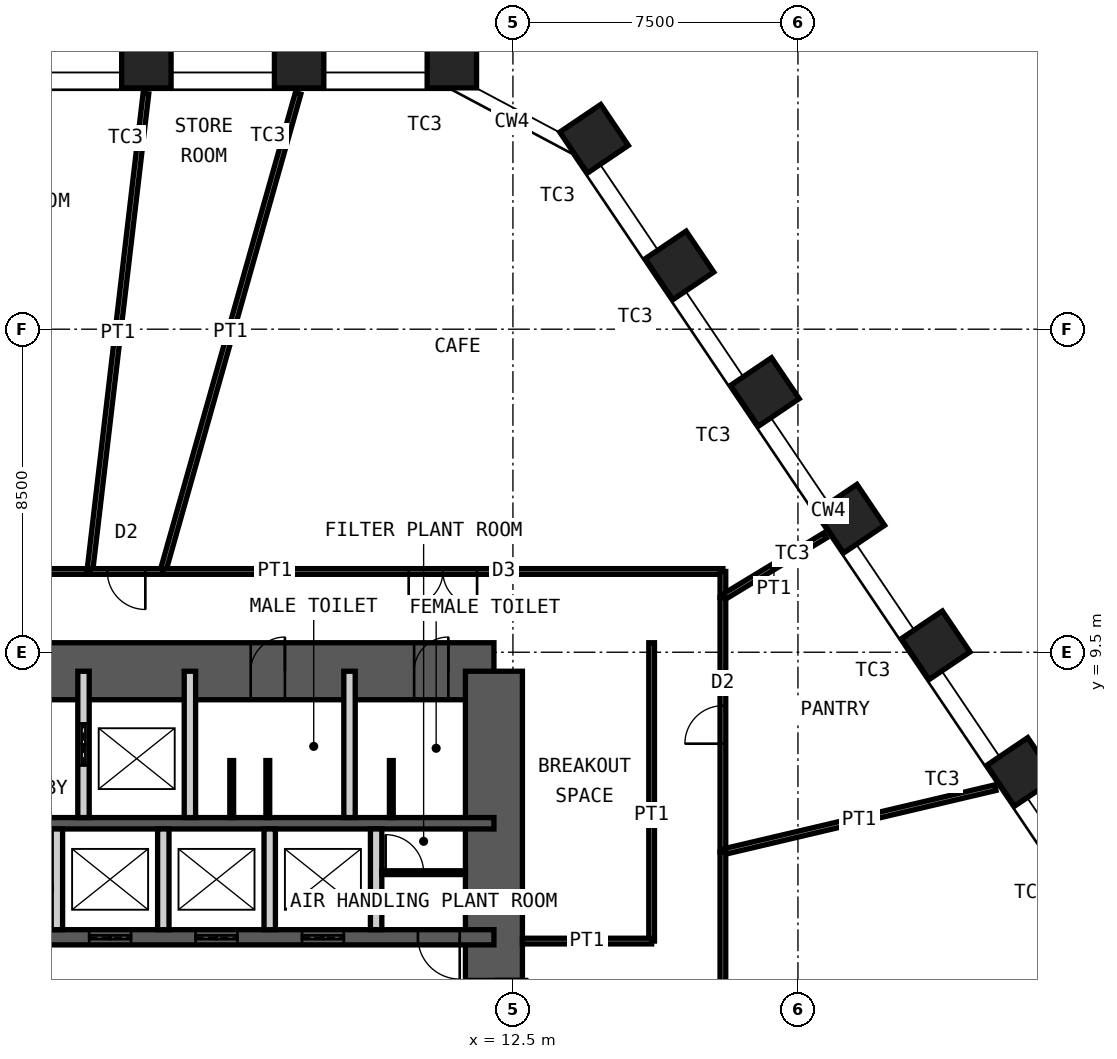
"""IFC4 building model, lengths in metres.
Left out: names, types, materials, properties, quantities, classifications, styles, units other than length and angle.
Written with IfcOpenShell. Run it as: python <this file> out.ifc"""

import sys

from ifc_helpers import new_model, si_unit, direction, frame, frame_2d, origin, origin_2d, place, context, subcontext, project, spatial, rectangle, hollow_rectangle, extrude, element, fill, save


model = new_model("IFC4")
c1 = context("Model", 3, precision=1e-05, world=origin(), true_north=direction((0.0, 1.0)))
c2 = subcontext(c1, "Body", "Model", "MODEL_VIEW")
j1 = project(units=[si_unit("LENGTHUNIT", "METRE"), si_unit("PLANEANGLEUNIT", "RADIAN")], contexts=[c1])
p1 = place(None, origin())
s1 = spatial("IfcSite", under=j1, at=p1, CompositionType="ELEMENT")
p2 = place(p1, origin())
s2 = spatial("IfcBuilding", under=s1, at=p2, CompositionType="ELEMENT")
p3 = place(p2, frame((0.0, 0.0, 132.4)))
s3 = spatial("IfcBuildingStorey", under=s2, at=p3, CompositionType="ELEMENT", Elevation=132.4)
for number, where, z_axis, x_axis in (
    (1, (2.854, 25.0, 0.0), (0.0, 0.0, 1.0), (-1.0, 0.0, 0.0)),
    (2, (6.874, 25.0, 0.0), (0.0, 0.0, 1.0), (-1.0, 0.0, 0.0)),
    (3, (10.893, 25.0, 0.0), (0.0, 0.0, 1.0), (-1.0, 0.0, 0.0)),
    (4, (14.635, 23.01, 0.0), (0.0, 0.0, 1.0), (-0.559, 0.829, 0.0)),
    (5, (16.882, 19.678, 0.0), (0.0, 0.0, 1.0), (-0.559, 0.829, 0.0)),
    (6, (19.13, 16.346, 0.0), (0.0, 0.0, 1.0), (-0.559, 0.829, 0.0)),
    (7, (21.377, 13.014, 0.0), (0.0, 0.0, 1.0), (-0.559, 0.829, 0.0)),
    (8, (23.625, 9.682, 0.0), (0.0, 0.0, 1.0), (-0.559, 0.829, 0.0)),
    (9, (25.872, 6.351, 0.0), (0.0, 0.0, 1.0), (-0.559, 0.829, 0.0)),
):
    element("IfcColumn", number, at=place(p3, frame(where, z_axis=z_axis, x_axis=x_axis)), inside=s3, PredefinedType="COLUMN", context=c2, shape_type="SweptSolid", body=[
        extrude(hollow_rectangle(XDim=1.3, YDim=1.3, WallThickness=0.1, at=origin_2d()), origin(), (0.0, 0.0, 1.0), 4.2),
    ])
p4 = place(p3, frame((-12.0, 9.0, 0.0), z_axis=(0.0, 0.0, 1.0), x_axis=(1.0, 0.0, 0.0)))
e10 = element("IfcWall", 10, at=p4, inside=s3, PredefinedType="SHEAR", context=c2, shape_type="SweptSolid", body=[
    extrude(rectangle(XDim=24.0, YDim=1.5, at=frame_2d((12.0, 0.0))), origin(), (0.0, 0.0, 1.0), 4.2),
])
p5 = place(p4, frame((10.4, 0.0, 0.0)))
e11 = element("IfcOpeningElement", 11, at=p5, cuts=e10, PredefinedType="OPENING", context=c2, shape_type="SweptSolid", body=[
    extrude(rectangle(XDim=1.0, YDim=2.1, at=frame_2d((0.5, 1.05))), frame((0.0, 0.76, 0.0), z_axis=(0.0, -1.0, 0.0), x_axis=(1.0, 0.0, 0.0)), (0.0, 0.0, 1.0), 1.52),
])
p6 = place(p4, frame((17.6, 0.0, 0.0)))
e12 = element("IfcOpeningElement", 12, at=p6, cuts=e10, PredefinedType="OPENING", context=c2, shape_type="SweptSolid", body=[
    extrude(rectangle(XDim=0.9, YDim=2.1, at=frame_2d((0.45, 1.05))), frame((0.0, 0.76, 0.0), z_axis=(0.0, -1.0, 0.0), x_axis=(1.0, 0.0, 0.0)), (0.0, 0.0, 1.0), 1.52),
])
p7 = place(p4, frame((21.9, 0.0, 0.0)))
e13 = element("IfcOpeningElement", 13, at=p7, cuts=e10, PredefinedType="OPENING", context=c2, shape_type="SweptSolid", body=[
    extrude(rectangle(XDim=0.9, YDim=2.1, at=frame_2d((0.45, 1.05))), frame((0.0, 0.76, 0.0), z_axis=(0.0, -1.0, 0.0), x_axis=(1.0, 0.0, 0.0)), (0.0, 0.0, 1.0), 1.52),
])
p8 = place(p3, frame((12.0, -9.0, 0.0), z_axis=(0.0, 0.0, 1.0), x_axis=(0.0, 1.0, 0.0)))
e14 = element("IfcWall", 14, at=p8, inside=s3, PredefinedType="SHEAR", context=c2, shape_type="SweptSolid", body=[
    extrude(rectangle(XDim=18.0, YDim=1.5, at=frame_2d((9.0, 0.0))), origin(), (0.0, 0.0, 1.0), 4.2),
])
p9 = place(p8, frame((8.1, 0.0, 0.0)))
e15 = element("IfcOpeningElement", 15, at=p9, cuts=e14, PredefinedType="OPENING", context=c2, shape_type="SweptSolid", body=[
    extrude(rectangle(XDim=1.8, YDim=2.1, at=frame_2d((0.9, 1.05))), frame((0.0, 0.76, 0.0), z_axis=(0.0, -1.0, 0.0), x_axis=(1.0, 0.0, 0.0)), (0.0, 0.0, 1.0), 1.52),
])
p10 = place(p3, frame((-12.0, 5.0, 0.0), z_axis=(0.0, 0.0, 1.0), x_axis=(1.0, 0.0, 0.0)))
e16 = element("IfcWall", 16, at=p10, inside=s3, PredefinedType="SHEAR", context=c2, shape_type="SweptSolid", body=[
    extrude(rectangle(XDim=24.0, YDim=0.3, at=frame_2d((12.0, 0.0))), origin(), (0.0, 0.0, 1.0), 4.2),
])
p11 = place(p3, frame((-12.0, 2.0, 0.0), z_axis=(0.0, 0.0, 1.0), x_axis=(1.0, 0.0, 0.0)))
e17 = element("IfcWall", 17, at=p11, inside=s3, PredefinedType="SHEAR", context=c2, shape_type="SweptSolid", body=[
    extrude(rectangle(XDim=24.0, YDim=0.4, at=frame_2d((12.0, 0.0))), origin(), (0.0, 0.0, 1.0), 4.2),
])
p12 = place(p11, frame((2.4, 0.0, 0.0)))
e18 = element("IfcOpeningElement", 18, at=p12, cuts=e17, PredefinedType="OPENING", context=c2, shape_type="SweptSolid", body=[
    extrude(rectangle(XDim=1.1, YDim=2.1, at=frame_2d((0.55, 1.05))), frame((0.0, 0.21, 0.0), z_axis=(0.0, -1.0, 0.0), x_axis=(1.0, 0.0, 0.0)), (0.0, 0.0, 1.0), 0.42),
])
p13 = place(p11, frame((22.0, 0.0, 0.0)))
e19 = element("IfcOpeningElement", 19, at=p13, cuts=e17, PredefinedType="OPENING", context=c2, shape_type="SweptSolid", body=[
    extrude(rectangle(XDim=1.1, YDim=2.1, at=frame_2d((0.55, 1.05))), frame((0.0, 0.21, 0.0), z_axis=(0.0, -1.0, 0.0), x_axis=(1.0, 0.0, 0.0)), (0.0, 0.0, 1.0), 0.42),
])
p14 = place(p11, frame((10.15, 0.0, 0.0)))
e20 = element("IfcOpeningElement", 20, at=p14, cuts=e17, PredefinedType="OPENING", context=c2, shape_type="SweptSolid", body=[
    extrude(rectangle(XDim=1.0, YDim=2.1, at=frame_2d((0.5, 1.05))), frame((0.0, 0.21, 0.0), z_axis=(0.0, -1.0, 0.0), x_axis=(1.0, 0.0, 0.0)), (0.0, 0.0, 1.0), 0.42),
])
p15 = place(p11, frame((6.9, 0.0, 0.0)))
e21 = element("IfcOpeningElement", 21, at=p15, cuts=e17, PredefinedType="OPENING", context=c2, shape_type="SweptSolid", body=[
    extrude(rectangle(XDim=1.0, YDim=2.1, at=frame_2d((0.5, 1.05))), frame((0.0, 0.21, 0.0), z_axis=(0.0, -1.0, 0.0), x_axis=(1.0, 0.0, 0.0)), (0.0, 0.0, 1.0), 0.42),
])
p16 = place(p11, frame((13.35, 0.0, 0.0)))
e22 = element("IfcOpeningElement", 22, at=p16, cuts=e17, PredefinedType="OPENING", context=c2, shape_type="SweptSolid", body=[
    extrude(rectangle(XDim=1.1, YDim=2.4, at=frame_2d((0.55, 1.2))), frame((0.0, 0.21, 0.0), z_axis=(0.0, -1.0, 0.0), x_axis=(1.0, 0.0, 0.0)), (0.0, 0.0, 1.0), 0.42),
])
p17 = place(p11, frame((16.15, 0.0, 0.0)))
e23 = element("IfcOpeningElement", 23, at=p17, cuts=e17, PredefinedType="OPENING", context=c2, shape_type="SweptSolid", body=[
    extrude(rectangle(XDim=1.1, YDim=2.4, at=frame_2d((0.55, 1.2))), frame((0.0, 0.21, 0.0), z_axis=(0.0, -1.0, 0.0), x_axis=(1.0, 0.0, 0.0)), (0.0, 0.0, 1.0), 0.42),
])
p18 = place(p11, frame((18.95, 0.0, 0.0)))
e24 = element("IfcOpeningElement", 24, at=p18, cuts=e17, PredefinedType="OPENING", context=c2, shape_type="SweptSolid", body=[
    extrude(rectangle(XDim=1.1, YDim=2.4, at=frame_2d((0.55, 1.2))), frame((0.0, 0.21, 0.0), z_axis=(0.0, -1.0, 0.0), x_axis=(1.0, 0.0, 0.0)), (0.0, 0.0, 1.0), 0.42),
])
p19 = place(p3, frame((1.2, 5.15, 0.0), z_axis=(0.0, 0.0, 1.0), x_axis=(0.0, 1.0, 0.0)))
e25 = element("IfcWall", 25, at=p19, inside=s3, PredefinedType="PARTITIONING", context=c2, shape_type="SweptSolid", body=[
    extrude(rectangle(XDim=3.85, YDim=0.3, at=frame_2d((1.925, 0.0))), origin(), (0.0, 0.0, 1.0), 3.98),
])
p20 = place(p19, frame((1.375, 0.0, 0.0)))
e26 = element("IfcOpeningElement", 26, at=p20, cuts=e25, PredefinedType="OPENING", context=c2, shape_type="SweptSolid", body=[
    extrude(rectangle(XDim=1.1, YDim=2.4, at=frame_2d((0.55, 1.2))), frame((0.0, 0.16, 0.0), z_axis=(0.0, -1.0, 0.0), x_axis=(1.0, 0.0, 0.0)), (0.0, 0.0, 1.0), 0.32),
])
for number, where, z_axis, x_axis in (
    (27, (4.0, 5.15, 0.0), (0.0, 0.0, 1.0), (0.0, 1.0, 0.0)),
    (28, (8.2, 5.15, 0.0), (0.0, 0.0, 1.0), (0.0, 1.0, 0.0)),
):
    element("IfcWall", number, at=place(p3, frame(where, z_axis=z_axis, x_axis=x_axis)), inside=s3, PredefinedType="PARTITIONING", context=c2, shape_type="SweptSolid", body=[
        extrude(rectangle(XDim=3.85, YDim=0.3, at=frame_2d((1.925, 0.0))), origin(), (0.0, 0.0, 1.0), 3.98),
    ])
for number, where, z_axis, x_axis in (
    (29, (0.5, 2.2, 0.0), (0.0, 0.0, 1.0), (0.0, 1.0, 0.0)),
    (30, (3.3, 2.2, 0.0), (0.0, 0.0, 1.0), (0.0, 1.0, 0.0)),
    (31, (6.1, 2.2, 0.0), (0.0, 0.0, 1.0), (0.0, 1.0, 0.0)),
    (32, (8.9, 2.2, 0.0), (0.0, 0.0, 1.0), (0.0, 1.0, 0.0)),
):
    element("IfcWall", number, at=place(p3, frame(where, z_axis=z_axis, x_axis=x_axis)), inside=s3, PredefinedType="PARTITIONING", context=c2, shape_type="SweptSolid", body=[
        extrude(rectangle(XDim=2.65, YDim=0.3, at=frame_2d((1.325, 0.0))), origin(), (0.0, 0.0, 1.0), 3.98),
    ])
p21 = place(p3, frame((9.05, 3.7, 0.0), z_axis=(0.0, 0.0, 1.0), x_axis=(1.0, 0.0, 0.0)))
e33 = element("IfcWall", 33, at=p21, inside=s3, PredefinedType="PARTITIONING", context=c2, shape_type="SweptSolid", body=[
    extrude(rectangle(XDim=2.2, YDim=0.1, at=frame_2d((1.1, 0.0))), origin(), (0.0, 0.0, 1.0), 3.98),
])
p22 = place(p21, frame((0.1, 0.0, 0.0)))
e34 = element("IfcOpeningElement", 34, at=p22, cuts=e33, PredefinedType="OPENING", context=c2, shape_type="SweptSolid", body=[
    extrude(rectangle(XDim=1.0, YDim=2.4, at=frame_2d((0.5, 1.2))), frame((0.0, 0.06, 0.0), z_axis=(0.0, -1.0, 0.0), x_axis=(1.0, 0.0, 0.0)), (0.0, 0.0, 1.0), 0.12),
])
for number, where, z_axis, x_axis in (
    (35, (5.1, 5.15, 0.0), (0.0, 0.0, 1.0), (0.0, 1.0, 0.0)),
    (36, (6.05, 5.15, 0.0), (0.0, 0.0, 1.0), (0.0, 1.0, 0.0)),
    (37, (9.3, 5.15, 0.0), (0.0, 0.0, 1.0), (0.0, 1.0, 0.0)),
):
    element("IfcWall", number, at=place(p3, frame(where, z_axis=z_axis, x_axis=x_axis)), inside=s3, PredefinedType="PARTITIONING", context=c2, shape_type="SweptSolid", body=[
        extrude(rectangle(XDim=1.5, YDim=0.1, at=frame_2d((0.75, 0.0))), origin(), (0.0, 0.0, 1.0), 2.1),
    ])
p23 = place(p3, frame((6.846, 24.204, 0.0), z_axis=(0.0, 0.0, 1.0), x_axis=(-0.272184461049, -0.962245093084, 0.0)))
e38 = element("IfcWall", 38, at=p23, inside=s3, PredefinedType="PARTITIONING", context=c2, shape_type="SweptSolid", body=[
    extrude(rectangle(XDim=13.073, YDim=0.15, at=frame_2d((6.536, 0.0))), origin(), (0.0, 0.0, 1.0), 3.33),
])
p24 = place(p3, frame((3.288, 11.625, 0.0), z_axis=(0.0, 0.0, 1.0), x_axis=(1.0, 0.0, 0.0)))
e39 = element("IfcWall", 39, at=p24, inside=s3, PredefinedType="PARTITIONING", context=c2, shape_type="SweptSolid", body=[
    extrude(rectangle(XDim=14.737, YDim=0.15, at=frame_2d((7.368, 0.0))), origin(), (0.0, 0.0, 1.0), 4.03),
])
p25 = place(p24, frame((6.468, 0.0, 0.0)))
e40 = element("IfcOpeningElement", 40, at=p25, cuts=e39, PredefinedType="OPENING", context=c2, shape_type="SweptSolid", body=[
    extrude(rectangle(XDim=1.8, YDim=2.4, at=frame_2d((0.9, 1.2))), frame((0.0, 0.085, 0.0), z_axis=(0.0, -1.0, 0.0), x_axis=(1.0, 0.0, 0.0)), (0.0, 0.0, 1.0), 0.17),
])
p26 = place(p3, frame((18.025, 11.625, 0.0), z_axis=(0.0, 0.0, 1.0), x_axis=(0.0, -1.0, 0.0)))
e41 = element("IfcWall", 41, at=p26, inside=s3, PredefinedType="PARTITIONING", context=c2, shape_type="SweptSolid", body=[
    extrude(rectangle(XDim=0.684, YDim=0.15, at=frame_2d((0.342, 0.0))), origin(), (0.0, 0.0, 1.0), 4.03),
])
p27 = place(p3, frame((20.711, 12.571, 0.0), z_axis=(0.0, 0.0, 1.0), x_axis=(-0.854890890653, -0.518807830587, 0.0)))
e42 = element("IfcWall", 42, at=p27, inside=s3, PredefinedType="PARTITIONING", context=c2, shape_type="SweptSolid", body=[
    extrude(rectangle(XDim=3.143, YDim=0.15, at=frame_2d((1.571, 0.0))), origin(), (0.0, 0.0, 1.0), 3.33),
])
p28 = place(p3, frame((18.025, 10.941, 0.0), z_axis=(0.0, 0.0, 1.0), x_axis=(0.0, -1.0, 0.0)))
e43 = element("IfcWall", 43, at=p28, inside=s3, PredefinedType="PARTITIONING", context=c2, shape_type="SweptSolid", body=[
    extrude(rectangle(XDim=6.694, YDim=0.15, at=frame_2d((3.347, 0.0))), origin(), (0.0, 0.0, 1.0), 4.03),
])
p29 = place(p28, frame((2.847, 0.0, 0.0)))
e44 = element("IfcOpeningElement", 44, at=p29, cuts=e43, PredefinedType="OPENING", context=c2, shape_type="SweptSolid", body=[
    extrude(rectangle(XDim=1.0, YDim=2.4, at=frame_2d((0.5, 1.2))), frame((0.0, 0.085, 0.0), z_axis=(0.0, -1.0, 0.0), x_axis=(1.0, 0.0, 0.0)), (0.0, 0.0, 1.0), 0.17),
])
p30 = place(p3, frame((25.194, 5.936, 0.0), z_axis=(0.0, 0.0, 1.0), x_axis=(-0.973348007689, -0.22933306767, 0.0)))
e45 = element("IfcWall", 45, at=p30, inside=s3, PredefinedType="PARTITIONING", context=c2, shape_type="SweptSolid", body=[
    extrude(rectangle(XDim=7.366, YDim=0.15, at=frame_2d((3.683, 0.0))), origin(), (0.0, 0.0, 1.0), 4.03),
])
p31 = place(p3, frame((18.025, 4.247, 0.0), z_axis=(0.0, 0.0, 1.0), x_axis=(0.0, -1.0, 0.0)))
e46 = element("IfcWall", 46, at=p31, inside=s3, PredefinedType="PARTITIONING", context=c2, shape_type="SweptSolid", body=[
    extrude(rectangle(XDim=15.872, YDim=0.15, at=frame_2d((7.936, 0.0))), origin(), (0.0, 0.0, 1.0), 4.03),
])
p32 = place(p31, frame((7.036, 0.0, 0.0)))
e47 = element("IfcOpeningElement", 47, at=p32, cuts=e46, PredefinedType="OPENING", context=c2, shape_type="SweptSolid", body=[
    extrude(rectangle(XDim=1.8, YDim=2.4, at=frame_2d((0.9, 1.2))), frame((0.0, 0.085, 0.0), z_axis=(0.0, -1.0, 0.0), x_axis=(1.0, 0.0, 0.0)), (0.0, 0.0, 1.0), 0.17),
])
p33 = place(p3, frame((-2.48, 11.625, 0.0), z_axis=(0.0, 0.0, 1.0), x_axis=(1.0, 0.0, 0.0)))
e48 = element("IfcWall", 48, at=p33, inside=s3, PredefinedType="PARTITIONING", context=c2, shape_type="SweptSolid", body=[
    extrude(rectangle(XDim=3.845, YDim=0.15, at=frame_2d((1.923, 0.0))), origin(), (0.0, 0.0, 1.0), 4.03),
])
p34 = place(p33, frame((1.423, 0.0, 0.0)))
e49 = element("IfcOpeningElement", 49, at=p34, cuts=e48, PredefinedType="OPENING", context=c2, shape_type="SweptSolid", body=[
    extrude(rectangle(XDim=1.0, YDim=2.4, at=frame_2d((0.5, 1.2))), frame((0.0, 0.085, 0.0), z_axis=(0.0, -1.0, 0.0), x_axis=(1.0, 0.0, 0.0)), (0.0, 0.0, 1.0), 0.17),
])
p35 = place(p3, frame((2.843, 24.201, 0.0), z_axis=(0.0, 0.0, 1.0), x_axis=(-0.116670084723, -0.993170726175, 0.0)))
e50 = element("IfcWall", 50, at=p35, inside=s3, PredefinedType="PARTITIONING", context=c2, shape_type="SweptSolid", body=[
    extrude(rectangle(XDim=12.662, YDim=0.15, at=frame_2d((6.331, 0.0))), origin(), (0.0, 0.0, 1.0), 3.33),
])
p36 = place(p3, frame((1.366, 11.625, 0.0), z_axis=(0.0, 0.0, 1.0), x_axis=(1.0, 0.0, 0.0)))
e51 = element("IfcWall", 51, at=p36, inside=s3, PredefinedType="PARTITIONING", context=c2, shape_type="SweptSolid", body=[
    extrude(rectangle(XDim=1.923, YDim=0.15, at=frame_2d((0.961, 0.0))), origin(), (0.0, 0.0, 1.0), 4.03),
])
p37 = place(p36, frame((0.461, 0.0, 0.0)))
e52 = element("IfcOpeningElement", 52, at=p37, cuts=e51, PredefinedType="OPENING", context=c2, shape_type="SweptSolid", body=[
    extrude(rectangle(XDim=1.0, YDim=2.4, at=frame_2d((0.5, 1.2))), frame((0.0, 0.085, 0.0), z_axis=(0.0, -1.0, 0.0), x_axis=(1.0, 0.0, 0.0)), (0.0, 0.0, 1.0), 0.17),
])
p38 = place(p3, frame((16.15, 1.9, 0.0), z_axis=(0.0, 0.0, 1.0), x_axis=(0.0, 1.0, 0.0)))
e53 = element("IfcWall", 53, at=p38, inside=s3, PredefinedType="PARTITIONING", context=c2, shape_type="SweptSolid", body=[
    extrude(rectangle(XDim=7.85, YDim=0.15, at=frame_2d((3.925, 0.0))), origin(), (0.0, 0.0, 1.0), 4.03),
])
p39 = place(p3, frame((12.75, 1.9, 0.0), z_axis=(0.0, 0.0, 1.0), x_axis=(1.0, 0.0, 0.0)))
e54 = element("IfcWall", 54, at=p39, inside=s3, PredefinedType="PARTITIONING", context=c2, shape_type="SweptSolid", body=[
    extrude(rectangle(XDim=3.4, YDim=0.15, at=frame_2d((1.7, 0.0))), origin(), (0.0, 0.0, 1.0), 2.93),
])
p40 = place(p6, origin())
e55 = element("IfcDoor", 55, at=p40, inside=s3, OperationType="SINGLE_SWING_LEFT", PredefinedType="DOOR", context=c2, shape_type="SweptSolid", body=[
    extrude(rectangle(XDim=0.9, YDim=2.1, at=frame_2d((0.45, 1.05))), frame((0.0, 0.025, 0.0), z_axis=(0.0, -1.0, 0.0), x_axis=(1.0, 0.0, 0.0)), (0.0, 0.0, 1.0), 0.05),
])
fill(e12, e55)
p41 = place(p7, origin())
e56 = element("IfcDoor", 56, at=p41, inside=s3, OperationType="SINGLE_SWING_LEFT", PredefinedType="DOOR", context=c2, shape_type="SweptSolid", body=[
    extrude(rectangle(XDim=0.9, YDim=2.1, at=frame_2d((0.45, 1.05))), frame((0.0, 0.025, 0.0), z_axis=(0.0, -1.0, 0.0), x_axis=(1.0, 0.0, 0.0)), (0.0, 0.0, 1.0), 0.05),
])
fill(e13, e56)
p42 = place(p13, origin())
e57 = element("IfcDoor", 57, at=p42, inside=s3, OperationType="SINGLE_SWING_RIGHT", PredefinedType="DOOR", context=c2, shape_type="SweptSolid", body=[
    extrude(rectangle(XDim=1.1, YDim=2.1, at=frame_2d((0.55, 1.05))), frame((0.0, 0.025, 0.0), z_axis=(0.0, -1.0, 0.0), x_axis=(1.0, 0.0, 0.0)), (0.0, 0.0, 1.0), 0.05),
])
fill(e19, e57)
p43 = place(p9, origin())
e58 = element("IfcDoor", 58, at=p43, inside=s3, OperationType="DOUBLE_DOOR_DOUBLE_SWING", PredefinedType="DOOR", context=c2, shape_type="SweptSolid", body=[
    extrude(rectangle(XDim=1.8, YDim=2.1, at=frame_2d((0.9, 1.05))), frame((0.0, 0.025, 0.0), z_axis=(0.0, -1.0, 0.0), x_axis=(1.0, 0.0, 0.0)), (0.0, 0.0, 1.0), 0.05),
])
fill(e15, e58)
p44 = place(p20, origin())
e59 = element("IfcDoor", 59, at=p44, inside=s3, OperationType="DOUBLE_DOOR_SLIDING", PredefinedType="DOOR", context=c2, shape_type="SweptSolid", body=[
    extrude(rectangle(XDim=1.1, YDim=2.4, at=frame_2d((0.55, 1.2))), frame((0.0, 0.025, 0.0), z_axis=(0.0, -1.0, 0.0), x_axis=(1.0, 0.0, 0.0)), (0.0, 0.0, 1.0), 0.05),
])
fill(e26, e59)
p45 = place(p16, origin())
e60 = element("IfcDoor", 60, at=p45, inside=s3, OperationType="DOUBLE_DOOR_SLIDING", PredefinedType="DOOR", context=c2, shape_type="SweptSolid", body=[
    extrude(rectangle(XDim=1.1, YDim=2.4, at=frame_2d((0.55, 1.2))), frame((0.0, 0.025, 0.0), z_axis=(0.0, -1.0, 0.0), x_axis=(1.0, 0.0, 0.0)), (0.0, 0.0, 1.0), 0.05),
])
fill(e22, e60)
p46 = place(p17, origin())
e61 = element("IfcDoor", 61, at=p46, inside=s3, OperationType="DOUBLE_DOOR_SLIDING", PredefinedType="DOOR", context=c2, shape_type="SweptSolid", body=[
    extrude(rectangle(XDim=1.1, YDim=2.4, at=frame_2d((0.55, 1.2))), frame((0.0, 0.025, 0.0), z_axis=(0.0, -1.0, 0.0), x_axis=(1.0, 0.0, 0.0)), (0.0, 0.0, 1.0), 0.05),
])
fill(e23, e61)
p47 = place(p18, origin())
e62 = element("IfcDoor", 62, at=p47, inside=s3, OperationType="DOUBLE_DOOR_SLIDING", PredefinedType="DOOR", context=c2, shape_type="SweptSolid", body=[
    extrude(rectangle(XDim=1.1, YDim=2.4, at=frame_2d((0.55, 1.2))), frame((0.0, 0.025, 0.0), z_axis=(0.0, -1.0, 0.0), x_axis=(1.0, 0.0, 0.0)), (0.0, 0.0, 1.0), 0.05),
])
fill(e24, e62)
p48 = place(p22, origin())
e63 = element("IfcDoor", 63, at=p48, inside=s3, OperationType="SINGLE_SWING_RIGHT", PredefinedType="DOOR", context=c2, shape_type="SweptSolid", body=[
    extrude(rectangle(XDim=1.0, YDim=2.4, at=frame_2d((0.5, 1.2))), frame((0.0, 0.025, 0.0), z_axis=(0.0, -1.0, 0.0), x_axis=(1.0, 0.0, 0.0)), (0.0, 0.0, 1.0), 0.05),
])
fill(e34, e63)
p49 = place(p25, origin())
e64 = element("IfcDoor", 64, at=p49, inside=s3, OperationType="DOUBLE_DOOR_DOUBLE_SWING", PredefinedType="DOOR", context=c2, shape_type="SweptSolid", body=[
    extrude(rectangle(XDim=1.8, YDim=2.4, at=frame_2d((0.9, 1.2))), frame((0.0, 0.025, 0.0), z_axis=(0.0, -1.0, 0.0), x_axis=(1.0, 0.0, 0.0)), (0.0, 0.0, 1.0), 0.05),
])
fill(e40, e64)
p50 = place(p29, origin())
e65 = element("IfcDoor", 65, at=p50, inside=s3, OperationType="SINGLE_SWING_RIGHT", PredefinedType="DOOR", context=c2, shape_type="SweptSolid", body=[
    extrude(rectangle(XDim=1.0, YDim=2.4, at=frame_2d((0.5, 1.2))), frame((0.0, 0.025, 0.0), z_axis=(0.0, -1.0, 0.0), x_axis=(1.0, 0.0, 0.0)), (0.0, 0.0, 1.0), 0.05),
])
fill(e44, e65)
p51 = place(p37, origin())
e66 = element("IfcDoor", 66, at=p51, inside=s3, OperationType="SINGLE_SWING_RIGHT", PredefinedType="DOOR", context=c2, shape_type="SweptSolid", body=[
    extrude(rectangle(XDim=1.0, YDim=2.4, at=frame_2d((0.5, 1.2))), frame((0.0, 0.025, 0.0), z_axis=(0.0, -1.0, 0.0), x_axis=(1.0, 0.0, 0.0)), (0.0, 0.0, 1.0), 0.05),
])
fill(e52, e66)
save(model, sys.argv[1])
